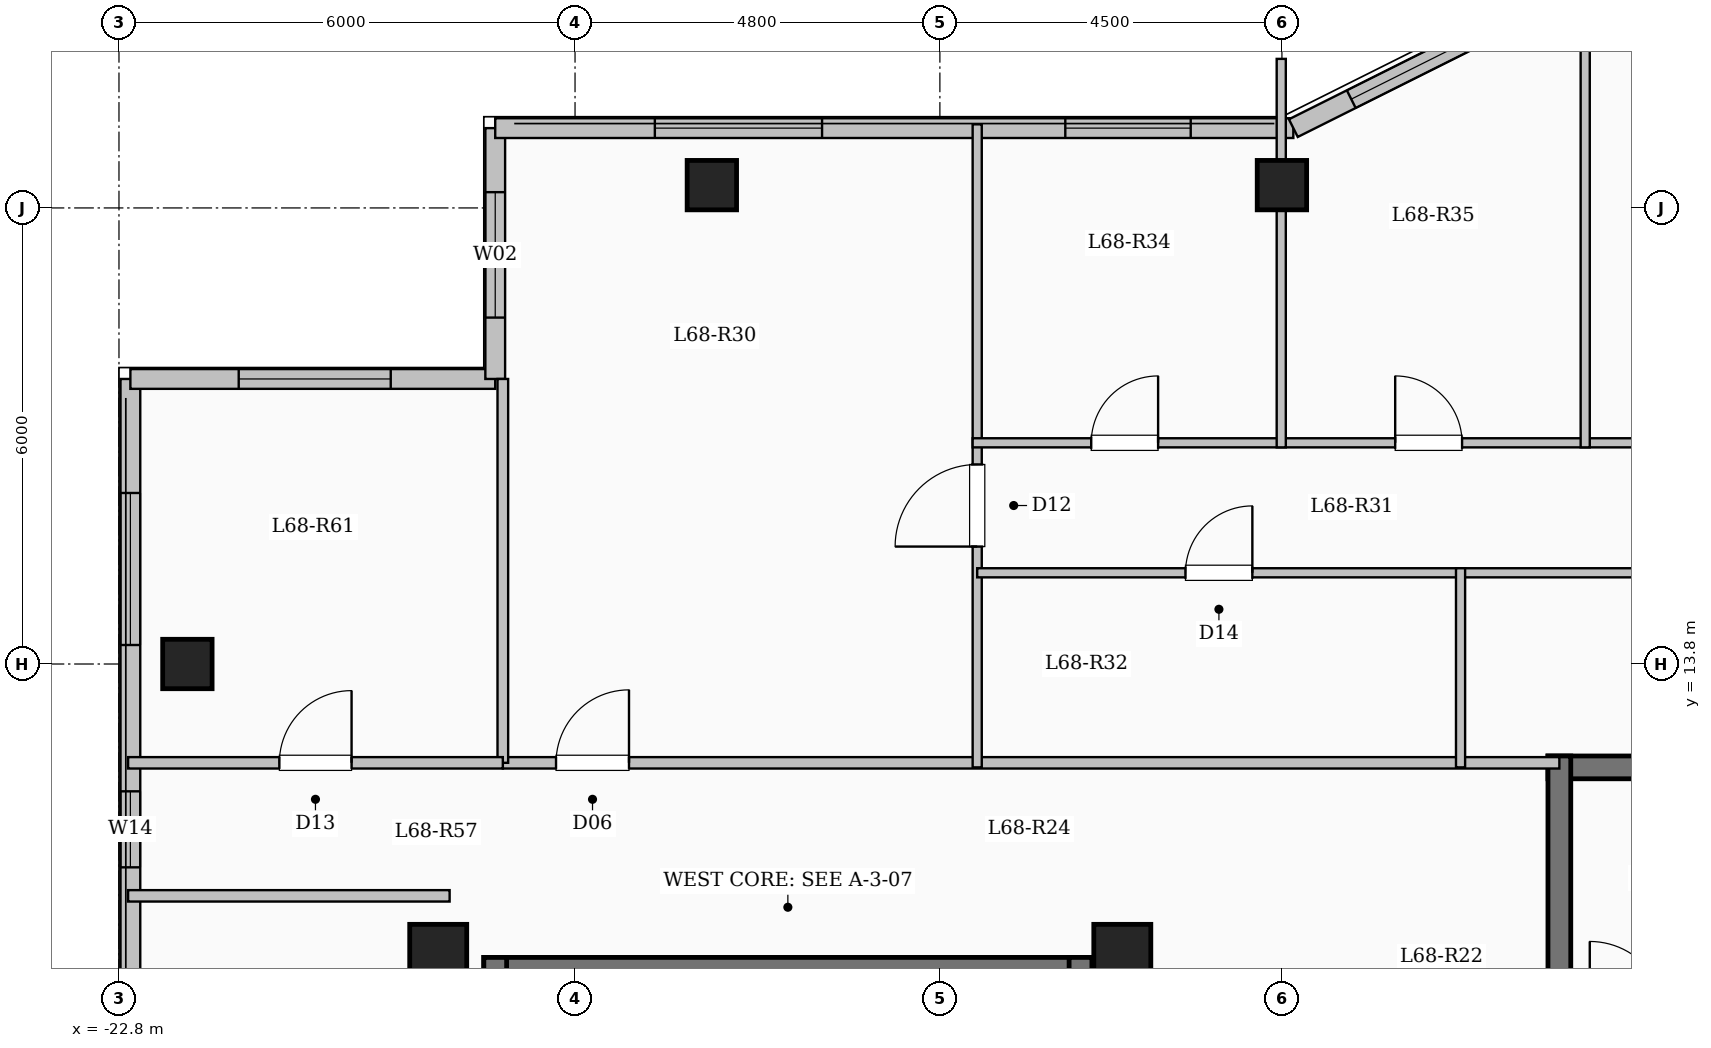
"""IFC4 building model, lengths in metres.
Left out: names, types, materials, properties, quantities, classifications, styles, units other than length and angle.
Written with IfcOpenShell. Run it as: python <this file> out.ifc"""

import sys

from ifc_helpers import new_model, si_unit, direction, frame, frame_2d, origin, origin_2d, place, context, subcontext, project, spatial, rectangle, extrude, element, fill, save


model = new_model("IFC4")
c1 = context("Model", 3, precision=1e-05, world=origin(), true_north=direction((0.0, 1.0)))
c2 = subcontext(c1, "Body", "Model", "MODEL_VIEW")
j1 = project(units=[si_unit("LENGTHUNIT", "METRE"), si_unit("PLANEANGLEUNIT", "RADIAN")], contexts=[c1])
p1 = place(None, origin())
s1 = spatial("IfcSite", under=j1, at=p1, CompositionType="ELEMENT")
p2 = place(p1, origin())
s2 = spatial("IfcBuilding", under=s1, at=p2, CompositionType="ELEMENT")
p3 = place(p2, frame((0.0, 0.0, 251.55)))
s3 = spatial("IfcBuildingStorey", under=s2, at=p3, CompositionType="ELEMENT", Elevation=251.55)
for number, where, z_axis, x_axis in (
    (1, (-9.6, 10.0, 0.0), (0.0, 0.0, 1.0), (1.0, 0.0, 0.0)),
    (2, (-18.6, 10.0, 0.0), (0.0, 0.0, 1.0), (1.0, 0.0, 0.0)),
):
    element("IfcColumn", number, at=place(p3, frame(where, z_axis=z_axis, x_axis=x_axis)), inside=s3, PredefinedType="COLUMN", context=c2, shape_type="SweptSolid", body=[
        extrude(rectangle(XDim=0.75, YDim=0.75, at=origin_2d()), origin(), (0.0, 0.0, 1.0), 3.35),
    ])
for number, where, z_axis, x_axis in (
    (3, (-15.0, 20.1, 0.0), (0.0, 0.0, 1.0), (1.0, 0.0, 0.0)),
    (4, (-7.5, 20.1, 0.0), (0.0, 0.0, 1.0), (1.0, 0.0, 0.0)),
    (5, (-21.9, 13.8, 0.0), (0.0, 0.0, 1.0), (1.0, 0.0, 0.0)),
):
    element("IfcColumn", number, at=place(p3, frame(where, z_axis=z_axis, x_axis=x_axis)), inside=s3, PredefinedType="COLUMN", context=c2, shape_type="SweptSolid", body=[
        extrude(rectangle(XDim=0.65, YDim=0.65, at=origin_2d()), origin(), (0.0, 0.0, 1.0), 3.35),
    ])
p4 = place(p3, frame((-22.65, -17.55, 0.0), z_axis=(0.0, 0.0, 1.0), x_axis=(0.0, 1.0, 0.0)))
e6 = element("IfcWall", 6, at=p4, inside=s3, PredefinedType="SOLIDWALL", context=c2, shape_type="SweptSolid", body=[
    extrude(rectangle(XDim=35.1, YDim=0.26, at=frame_2d((17.55, 0.0))), origin(), (0.0, 0.0, 1.0), 3.1),
])
p5 = place(p4, frame((2.975, 0.0, 0.9)))
e7 = element("IfcOpeningElement", 7, at=p5, cuts=e6, PredefinedType="OPENING", context=c2, shape_type="SweptSolid", body=[
    extrude(rectangle(XDim=2.2, YDim=1.75, at=frame_2d((1.1, 0.875))), frame((0.0, 0.14, 0.0), z_axis=(0.0, -1.0, 0.0), x_axis=(1.0, 0.0, 0.0)), (0.0, 0.0, 1.0), 0.28),
])
p6 = place(p4, frame((8.625, 0.0, 0.95)))
e8 = element("IfcOpeningElement", 8, at=p6, cuts=e6, PredefinedType="OPENING", context=c2, shape_type="SweptSolid", body=[
    extrude(rectangle(XDim=1.2, YDim=1.5, at=frame_2d((0.6, 0.75))), frame((0.0, 0.14, 0.0), z_axis=(0.0, -1.0, 0.0), x_axis=(1.0, 0.0, 0.0)), (0.0, 0.0, 1.0), 0.28),
])
p7 = place(p4, frame((18.3, 0.0, 0.9)))
e9 = element("IfcOpeningElement", 9, at=p7, cuts=e6, PredefinedType="OPENING", context=c2, shape_type="SweptSolid", body=[
    extrude(rectangle(XDim=2.0, YDim=1.7, at=frame_2d((1.0, 0.85))), frame((0.0, 0.14, 0.0), z_axis=(0.0, -1.0, 0.0), x_axis=(1.0, 0.0, 0.0)), (0.0, 0.0, 1.0), 0.28),
])
p8 = place(p4, frame((28.675, 0.0, 0.95)))
e10 = element("IfcOpeningElement", 10, at=p8, cuts=e6, PredefinedType="OPENING", context=c2, shape_type="SweptSolid", body=[
    extrude(rectangle(XDim=1.0, YDim=1.5, at=frame_2d((0.5, 0.75))), frame((0.0, 0.14, 0.0), z_axis=(0.0, -1.0, 0.0), x_axis=(1.0, 0.0, 0.0)), (0.0, 0.0, 1.0), 0.28),
])
p9 = place(p4, frame((31.6, 0.0, 0.9)))
e11 = element("IfcOpeningElement", 11, at=p9, cuts=e6, PredefinedType="OPENING", context=c2, shape_type="SweptSolid", body=[
    extrude(rectangle(XDim=2.0, YDim=1.7, at=frame_2d((1.0, 0.85))), frame((0.0, 0.14, 0.0), z_axis=(0.0, -1.0, 0.0), x_axis=(1.0, 0.0, 0.0)), (0.0, 0.0, 1.0), 0.28),
])
p10 = place(p3, frame((-22.65, 17.55, 0.0), z_axis=(0.0, 0.0, 1.0), x_axis=(1.0, 0.0, 0.0)))
e12 = element("IfcWall", 12, at=p10, inside=s3, PredefinedType="SOLIDWALL", context=c2, shape_type="SweptSolid", body=[
    extrude(rectangle(XDim=4.8, YDim=0.26, at=frame_2d((2.4, 0.0))), origin(), (0.0, 0.0, 1.0), 3.1),
])
p11 = place(p10, frame((1.425, 0.0, 0.9)))
e13 = element("IfcOpeningElement", 13, at=p11, cuts=e12, PredefinedType="OPENING", context=c2, shape_type="SweptSolid", body=[
    extrude(rectangle(XDim=2.0, YDim=1.7, at=frame_2d((1.0, 0.85))), frame((0.0, 0.14, 0.0), z_axis=(0.0, -1.0, 0.0), x_axis=(1.0, 0.0, 0.0)), (0.0, 0.0, 1.0), 0.28),
])
p12 = place(p3, frame((-17.85, 17.55, 0.0), z_axis=(0.0, 0.0, 1.0), x_axis=(0.0, 1.0, 0.0)))
e14 = element("IfcWall", 14, at=p12, inside=s3, PredefinedType="SOLIDWALL", context=c2, shape_type="SweptSolid", body=[
    extrude(rectangle(XDim=3.3, YDim=0.26, at=frame_2d((1.65, 0.0))), origin(), (0.0, 0.0, 1.0), 3.1),
])
p13 = place(p12, frame((0.808, 0.0, 0.9)))
e15 = element("IfcOpeningElement", 15, at=p13, cuts=e14, PredefinedType="OPENING", context=c2, shape_type="SweptSolid", body=[
    extrude(rectangle(XDim=1.65, YDim=1.6, at=frame_2d((0.825, 0.8))), frame((0.0, 0.14, 0.0), z_axis=(0.0, -1.0, 0.0), x_axis=(1.0, 0.0, 0.0)), (0.0, 0.0, 1.0), 0.28),
])
p14 = place(p3, frame((-17.85, 20.85, 0.0), z_axis=(0.0, 0.0, 1.0), x_axis=(1.0, 0.0, 0.0)))
e16 = element("IfcWall", 16, at=p14, inside=s3, PredefinedType="SOLIDWALL", context=c2, shape_type="SweptSolid", body=[
    extrude(rectangle(XDim=10.5, YDim=0.26, at=frame_2d((5.25, 0.0))), origin(), (0.0, 0.0, 1.0), 3.1),
])
p15 = place(p14, frame((2.1, 0.0, 0.9)))
e17 = element("IfcOpeningElement", 17, at=p15, cuts=e16, PredefinedType="OPENING", context=c2, shape_type="SweptSolid", body=[
    extrude(rectangle(XDim=2.2, YDim=1.75, at=frame_2d((1.1, 0.875))), frame((0.0, 0.14, 0.0), z_axis=(0.0, -1.0, 0.0), x_axis=(1.0, 0.0, 0.0)), (0.0, 0.0, 1.0), 0.28),
])
p16 = place(p14, frame((7.5, 0.0, 0.9)))
e18 = element("IfcOpeningElement", 18, at=p16, cuts=e16, PredefinedType="OPENING", context=c2, shape_type="SweptSolid", body=[
    extrude(rectangle(XDim=1.65, YDim=1.6, at=frame_2d((0.825, 0.8))), frame((0.0, 0.14, 0.0), z_axis=(0.0, -1.0, 0.0), x_axis=(1.0, 0.0, 0.0)), (0.0, 0.0, 1.0), 0.28),
])
p17 = place(p3, frame((-7.35, 20.85, 0.0), z_axis=(0.0, 0.0, 1.0), x_axis=(0.894427191, 0.4472135955, 0.0)))
e19 = element("IfcWall", 19, at=p17, inside=s3, PredefinedType="SOLIDWALL", context=c2, shape_type="SweptSolid", body=[
    extrude(rectangle(XDim=3.354, YDim=0.26, at=frame_2d((1.677, 0.0))), origin(), (0.0, 0.0, 1.0), 3.1),
])
p18 = place(p17, frame((0.852, 0.0, 0.9)))
e20 = element("IfcOpeningElement", 20, at=p18, cuts=e19, PredefinedType="OPENING", context=c2, shape_type="SweptSolid", body=[
    extrude(rectangle(XDim=1.65, YDim=1.6, at=frame_2d((0.825, 0.8))), frame((0.0, 0.14, 0.0), z_axis=(0.0, -1.0, 0.0), x_axis=(1.0, 0.0, 0.0)), (0.0, 0.0, 1.0), 0.28),
])
p19 = place(p3, frame((-18.0, 9.79, 0.0), z_axis=(0.0, 0.0, 1.0), x_axis=(1.0, 0.0, 0.0)))
e21 = element("IfcWall", 21, at=p19, inside=s3, PredefinedType="SHEAR", context=c2, shape_type="SweptSolid", body=[
    extrude(rectangle(XDim=8.0, YDim=0.3, at=frame_2d((4.0, 0.0))), origin(), (0.0, 0.0, 1.0), 3.35),
])
for number, where, z_axis, x_axis in (
    (22, (-17.85, 6.35, 0.0), (0.0, 0.0, 1.0), (0.0, 1.0, 0.0)),
    (23, (-10.15, 6.35, 0.0), (0.0, 0.0, 1.0), (0.0, 1.0, 0.0)),
):
    element("IfcWall", number, at=place(p3, frame(where, z_axis=z_axis, x_axis=x_axis)), inside=s3, PredefinedType="SHEAR", context=c2, shape_type="SweptSolid", body=[
        extrude(rectangle(XDim=3.59, YDim=0.3, at=frame_2d((1.795, 0.0))), origin(), (0.0, 0.0, 1.0), 3.35),
    ])
p20 = place(p3, frame((-4.0, 12.44, 0.0), z_axis=(0.0, 0.0, 1.0), x_axis=(1.0, 0.0, 0.0)))
e24 = element("IfcWall", 24, at=p20, inside=s3, PredefinedType="SHEAR", context=c2, shape_type="SweptSolid", body=[
    extrude(rectangle(XDim=8.0, YDim=0.3, at=frame_2d((4.0, 0.0))), origin(), (0.0, 0.0, 1.0), 3.35),
])
p21 = place(p3, frame((-3.85, 9.0, 0.0), z_axis=(0.0, 0.0, 1.0), x_axis=(0.0, 1.0, 0.0)))
e25 = element("IfcWall", 25, at=p21, inside=s3, PredefinedType="SHEAR", context=c2, shape_type="SweptSolid", body=[
    extrude(rectangle(XDim=3.59, YDim=0.3, at=frame_2d((1.795, 0.0))), origin(), (0.0, 0.0, 1.0), 3.35),
])
p22 = place(p3, frame((-17.75, 12.5, 0.0), z_axis=(0.0, 0.0, 1.0), x_axis=(1.0, 0.0, 0.0)))
e26 = element("IfcWall", 26, at=p22, inside=s3, PredefinedType="PARTITIONING", context=c2, shape_type="SweptSolid", body=[
    extrude(rectangle(XDim=13.9, YDim=0.15, at=frame_2d((6.95, 0.0))), origin(), (0.0, 0.0, 1.0), 3.1),
])
p23 = place(p22, frame((0.7, 0.0, 0.0)))
e27 = element("IfcOpeningElement", 27, at=p23, cuts=e26, PredefinedType="OPENING", context=c2, shape_type="SweptSolid", body=[
    extrude(rectangle(XDim=0.96, YDim=2.15, at=frame_2d((0.48, 1.075))), frame((0.0, 0.085, 0.0), z_axis=(0.0, -1.0, 0.0), x_axis=(1.0, 0.0, 0.0)), (0.0, 0.0, 1.0), 0.17),
])
p24 = place(p3, frame((-11.509, 12.44, 0.0), z_axis=(0.0, 0.0, 1.0), x_axis=(0.0, 1.0, 0.0)))
e28 = element("IfcWall", 28, at=p24, inside=s3, PredefinedType="PARTITIONING", context=c2, shape_type="SweptSolid", body=[
    extrude(rectangle(XDim=8.46, YDim=0.12, at=frame_2d((4.23, 0.0))), origin(), (0.0, 0.0, 1.0), 3.1),
])
p25 = place(p24, frame((2.905, 0.0, 0.0)))
e29 = element("IfcOpeningElement", 29, at=p25, cuts=e28, PredefinedType="OPENING", context=c2, shape_type="SweptSolid", body=[
    extrude(rectangle(XDim=1.08, YDim=2.15, at=frame_2d((0.54, 1.075))), frame((0.0, 0.07, 0.0), z_axis=(0.0, -1.0, 0.0), x_axis=(1.0, 0.0, 0.0)), (0.0, 0.0, 1.0), 0.14),
])
p26 = place(p3, frame((-11.509, 15.0, 0.0), z_axis=(0.0, 0.0, 1.0), x_axis=(1.0, 0.0, 0.0)))
e30 = element("IfcWall", 30, at=p26, inside=s3, PredefinedType="PARTITIONING", context=c2, shape_type="SweptSolid", body=[
    extrude(rectangle(XDim=6.359, YDim=0.12, at=frame_2d((3.18, 0.0))), origin(), (0.0, 0.0, 1.0), 3.1),
])
p27 = place(p26, frame((2.74, 0.0, 0.0)))
e31 = element("IfcOpeningElement", 31, at=p27, cuts=e30, PredefinedType="OPENING", context=c2, shape_type="SweptSolid", body=[
    extrude(rectangle(XDim=0.88, YDim=2.1, at=frame_2d((0.44, 1.05))), frame((0.0, 0.07, 0.0), z_axis=(0.0, -1.0, 0.0), x_axis=(1.0, 0.0, 0.0)), (0.0, 0.0, 1.0), 0.14),
])
p28 = place(p3, frame((-5.15, 15.0, 0.0), z_axis=(0.0, 0.0, 1.0), x_axis=(1.0, 0.0, 0.0)))
e32 = element("IfcWall", 32, at=p28, inside=s3, PredefinedType="PARTITIONING", context=c2, shape_type="SweptSolid", body=[
    extrude(rectangle(XDim=5.7, YDim=0.12, at=frame_2d((2.85, 0.0))), origin(), (0.0, 0.0, 1.0), 3.1),
])
p29 = place(p28, frame((2.41, 0.0, 0.0)))
e33 = element("IfcOpeningElement", 33, at=p29, cuts=e32, PredefinedType="OPENING", context=c2, shape_type="SweptSolid", body=[
    extrude(rectangle(XDim=0.88, YDim=2.1, at=frame_2d((0.44, 1.05))), frame((0.0, 0.07, 0.0), z_axis=(0.0, -1.0, 0.0), x_axis=(1.0, 0.0, 0.0)), (0.0, 0.0, 1.0), 0.14),
])
p30 = place(p3, frame((-11.569, 16.71, 0.0), z_axis=(0.0, 0.0, 1.0), x_axis=(1.0, 0.0, 0.0)))
e34 = element("IfcWall", 34, at=p30, inside=s3, PredefinedType="PARTITIONING", context=c2, shape_type="SweptSolid", body=[
    extrude(rectangle(XDim=12.179, YDim=0.12, at=frame_2d((6.09, 0.0))), origin(), (0.0, 0.0, 1.0), 2.785),
])
p31 = place(p30, frame((1.56, 0.0, 0.0)))
e35 = element("IfcOpeningElement", 35, at=p31, cuts=e34, PredefinedType="OPENING", context=c2, shape_type="SweptSolid", body=[
    extrude(rectangle(XDim=0.88, YDim=2.1, at=frame_2d((0.44, 1.05))), frame((0.0, 0.07, 0.0), z_axis=(0.0, -1.0, 0.0), x_axis=(1.0, 0.0, 0.0)), (0.0, 0.0, 1.0), 0.14),
])
p32 = place(p30, frame((5.559, 0.0, 0.0)))
e36 = element("IfcOpeningElement", 36, at=p32, cuts=e34, PredefinedType="OPENING", context=c2, shape_type="SweptSolid", body=[
    extrude(rectangle(XDim=0.88, YDim=2.1, at=frame_2d((0.44, 1.05))), frame((0.0, 0.07, 0.0), z_axis=(0.0, -1.0, 0.0), x_axis=(1.0, 0.0, 0.0)), (0.0, 0.0, 1.0), 0.14),
])
p33 = place(p30, frame((9.559, 0.0, 0.0)))
e37 = element("IfcOpeningElement", 37, at=p33, cuts=e34, PredefinedType="OPENING", context=c2, shape_type="SweptSolid", body=[
    extrude(rectangle(XDim=0.88, YDim=2.1, at=frame_2d((0.44, 1.05))), frame((0.0, 0.07, 0.0), z_axis=(0.0, -1.0, 0.0), x_axis=(1.0, 0.0, 0.0)), (0.0, 0.0, 1.0), 0.14),
])
p34 = place(p3, frame((-5.15, 12.44, 0.0), z_axis=(0.0, 0.0, 1.0), x_axis=(0.0, 1.0, 0.0)))
e38 = element("IfcWall", 38, at=p34, inside=s3, PredefinedType="PARTITIONING", context=c2, shape_type="SweptSolid", body=[
    extrude(rectangle(XDim=2.62, YDim=0.12, at=frame_2d((1.31, 0.0))), origin(), (0.0, 0.0, 1.0), 3.1),
])
p35 = place(p3, frame((-7.509, 16.65, 0.0), z_axis=(0.0, 0.0, 1.0), x_axis=(0.0, 1.0, 0.0)))
e39 = element("IfcWall", 39, at=p35, inside=s3, PredefinedType="PARTITIONING", context=c2, shape_type="SweptSolid", body=[
    extrude(rectangle(XDim=5.111, YDim=0.12, at=frame_2d((2.556, 0.0))), origin(), (0.0, 0.0, 1.0), 2.685),
])
p36 = place(p3, frame((-3.51, 16.65, 0.0), z_axis=(0.0, 0.0, 1.0), x_axis=(0.0, 1.0, 0.0)))
e40 = element("IfcWall", 40, at=p36, inside=s3, PredefinedType="PARTITIONING", context=c2, shape_type="SweptSolid", body=[
    extrude(rectangle(XDim=5.73, YDim=0.12, at=frame_2d((2.865, 0.0))), origin(), (0.0, 0.0, 1.0), 3.1),
])
p37 = place(p3, frame((-22.68, 10.75, 0.0), z_axis=(0.0, 0.0, 1.0), x_axis=(1.0, 0.0, 0.0)))
e41 = element("IfcWall", 41, at=p37, inside=s3, PredefinedType="PARTITIONING", context=c2, shape_type="SweptSolid", body=[
    extrude(rectangle(XDim=4.23, YDim=0.15, at=frame_2d((2.115, 0.0))), origin(), (0.0, 0.0, 1.0), 3.1),
])
p38 = place(p3, frame((-17.75, 12.5, 0.0), z_axis=(0.0, 0.0, 1.0), x_axis=(0.0, 1.0, 0.0)))
e42 = element("IfcWall", 42, at=p38, inside=s3, PredefinedType="PARTITIONING", context=c2, shape_type="SweptSolid", body=[
    extrude(rectangle(XDim=5.05, YDim=0.14, at=frame_2d((2.525, 0.0))), origin(), (0.0, 0.0, 1.0), 3.1),
])
p39 = place(p3, frame((-22.68, 12.5, 0.0), z_axis=(0.0, 0.0, 1.0), x_axis=(1.0, 0.0, 0.0)))
e43 = element("IfcWall", 43, at=p39, inside=s3, PredefinedType="PARTITIONING", context=c2, shape_type="SweptSolid", body=[
    extrude(rectangle(XDim=4.93, YDim=0.15, at=frame_2d((2.465, 0.0))), origin(), (0.0, 0.0, 1.0), 3.1),
])
p40 = place(p39, frame((1.99, 0.0, 0.0)))
e44 = element("IfcOpeningElement", 44, at=p40, cuts=e43, PredefinedType="OPENING", context=c2, shape_type="SweptSolid", body=[
    extrude(rectangle(XDim=0.95, YDim=2.15, at=frame_2d((0.475, 1.075))), frame((0.0, 0.085, 0.0), z_axis=(0.0, -1.0, 0.0), x_axis=(1.0, 0.0, 0.0)), (0.0, 0.0, 1.0), 0.17),
])
p41 = place(p8, origin())
e45 = element("IfcWindow", 45, at=p41, inside=s3, PartitioningType="SINGLE_PANEL", PredefinedType="WINDOW", context=c2, shape_type="SweptSolid", body=[
    extrude(rectangle(XDim=1.0, YDim=1.5, at=frame_2d((0.5, 0.75))), frame((0.0, 0.03, 0.0), z_axis=(0.0, -1.0, 0.0), x_axis=(1.0, 0.0, 0.0)), (0.0, 0.0, 1.0), 0.06),
])
fill(e10, e45)
p42 = place(p9, origin())
e46 = element("IfcWindow", 46, at=p42, inside=s3, PartitioningType="SINGLE_PANEL", PredefinedType="WINDOW", context=c2, shape_type="SweptSolid", body=[
    extrude(rectangle(XDim=2.0, YDim=1.7, at=frame_2d((1.0, 0.85))), frame((0.0, 0.03, 0.0), z_axis=(0.0, -1.0, 0.0), x_axis=(1.0, 0.0, 0.0)), (0.0, 0.0, 1.0), 0.06),
])
fill(e11, e46)
p43 = place(p11, origin())
e47 = element("IfcWindow", 47, at=p43, inside=s3, PartitioningType="SINGLE_PANEL", PredefinedType="WINDOW", context=c2, shape_type="SweptSolid", body=[
    extrude(rectangle(XDim=2.0, YDim=1.7, at=frame_2d((1.0, 0.85))), frame((0.0, 0.03, 0.0), z_axis=(0.0, -1.0, 0.0), x_axis=(1.0, 0.0, 0.0)), (0.0, 0.0, 1.0), 0.06),
])
fill(e13, e47)
p44 = place(p13, origin())
e48 = element("IfcWindow", 48, at=p44, inside=s3, PartitioningType="SINGLE_PANEL", PredefinedType="WINDOW", context=c2, shape_type="SweptSolid", body=[
    extrude(rectangle(XDim=1.65, YDim=1.6, at=frame_2d((0.825, 0.8))), frame((0.0, 0.03, 0.0), z_axis=(0.0, -1.0, 0.0), x_axis=(1.0, 0.0, 0.0)), (0.0, 0.0, 1.0), 0.06),
])
fill(e15, e48)
p45 = place(p15, origin())
e49 = element("IfcWindow", 49, at=p45, inside=s3, PartitioningType="SINGLE_PANEL", PredefinedType="WINDOW", context=c2, shape_type="SweptSolid", body=[
    extrude(rectangle(XDim=2.2, YDim=1.75, at=frame_2d((1.1, 0.875))), frame((0.0, 0.03, 0.0), z_axis=(0.0, -1.0, 0.0), x_axis=(1.0, 0.0, 0.0)), (0.0, 0.0, 1.0), 0.06),
])
fill(e17, e49)
p46 = place(p16, origin())
e50 = element("IfcWindow", 50, at=p46, inside=s3, PartitioningType="SINGLE_PANEL", PredefinedType="WINDOW", context=c2, shape_type="SweptSolid", body=[
    extrude(rectangle(XDim=1.65, YDim=1.6, at=frame_2d((0.825, 0.8))), frame((0.0, 0.03, 0.0), z_axis=(0.0, -1.0, 0.0), x_axis=(1.0, 0.0, 0.0)), (0.0, 0.0, 1.0), 0.06),
])
fill(e18, e50)
p47 = place(p18, origin())
e51 = element("IfcWindow", 51, at=p47, inside=s3, PartitioningType="SINGLE_PANEL", PredefinedType="WINDOW", context=c2, shape_type="SweptSolid", body=[
    extrude(rectangle(XDim=1.65, YDim=1.6, at=frame_2d((0.825, 0.8))), frame((0.0, 0.03, 0.0), z_axis=(0.0, -1.0, 0.0), x_axis=(1.0, 0.0, 0.0)), (0.0, 0.0, 1.0), 0.06),
])
fill(e20, e51)
p48 = place(p23, origin())
e52 = element("IfcDoor", 52, at=p48, inside=s3, OperationType="SINGLE_SWING_RIGHT", PredefinedType="DOOR", context=c2, shape_type="SweptSolid", body=[
    extrude(rectangle(XDim=0.96, YDim=2.15, at=frame_2d((0.48, 1.075))), frame((0.0, 0.025, 0.0), z_axis=(0.0, -1.0, 0.0), x_axis=(1.0, 0.0, 0.0)), (0.0, 0.0, 1.0), 0.05),
])
fill(e27, e52)
p49 = place(p25, origin())
e53 = element("IfcDoor", 53, at=p49, inside=s3, OperationType="SINGLE_SWING_LEFT", PredefinedType="DOOR", context=c2, shape_type="SweptSolid", body=[
    extrude(rectangle(XDim=1.08, YDim=2.15, at=frame_2d((0.54, 1.075))), frame((0.0, 0.025, 0.0), z_axis=(0.0, -1.0, 0.0), x_axis=(1.0, 0.0, 0.0)), (0.0, 0.0, 1.0), 0.05),
])
fill(e29, e53)
p50 = place(p27, origin())
e54 = element("IfcDoor", 54, at=p50, inside=s3, OperationType="SINGLE_SWING_RIGHT", PredefinedType="DOOR", context=c2, shape_type="SweptSolid", body=[
    extrude(rectangle(XDim=0.88, YDim=2.1, at=frame_2d((0.44, 1.05))), frame((0.0, 0.025, 0.0), z_axis=(0.0, -1.0, 0.0), x_axis=(1.0, 0.0, 0.0)), (0.0, 0.0, 1.0), 0.05),
])
fill(e31, e54)
p51 = place(p31, origin())
e55 = element("IfcDoor", 55, at=p51, inside=s3, OperationType="SINGLE_SWING_RIGHT", PredefinedType="DOOR", context=c2, shape_type="SweptSolid", body=[
    extrude(rectangle(XDim=0.88, YDim=2.1, at=frame_2d((0.44, 1.05))), frame((0.0, 0.025, 0.0), z_axis=(0.0, -1.0, 0.0), x_axis=(1.0, 0.0, 0.0)), (0.0, 0.0, 1.0), 0.05),
])
fill(e35, e55)
p52 = place(p32, origin())
e56 = element("IfcDoor", 56, at=p52, inside=s3, OperationType="SINGLE_SWING_LEFT", PredefinedType="DOOR", context=c2, shape_type="SweptSolid", body=[
    extrude(rectangle(XDim=0.88, YDim=2.1, at=frame_2d((0.44, 1.05))), frame((0.0, 0.025, 0.0), z_axis=(0.0, -1.0, 0.0), x_axis=(1.0, 0.0, 0.0)), (0.0, 0.0, 1.0), 0.05),
])
fill(e36, e56)
p53 = place(p40, origin())
e57 = element("IfcDoor", 57, at=p53, inside=s3, OperationType="SINGLE_SWING_RIGHT", PredefinedType="DOOR", context=c2, shape_type="SweptSolid", body=[
    extrude(rectangle(XDim=0.95, YDim=2.15, at=frame_2d((0.475, 1.075))), frame((0.0, 0.025, 0.0), z_axis=(0.0, -1.0, 0.0), x_axis=(1.0, 0.0, 0.0)), (0.0, 0.0, 1.0), 0.05),
])
fill(e44, e57)
save(model, sys.argv[1])
